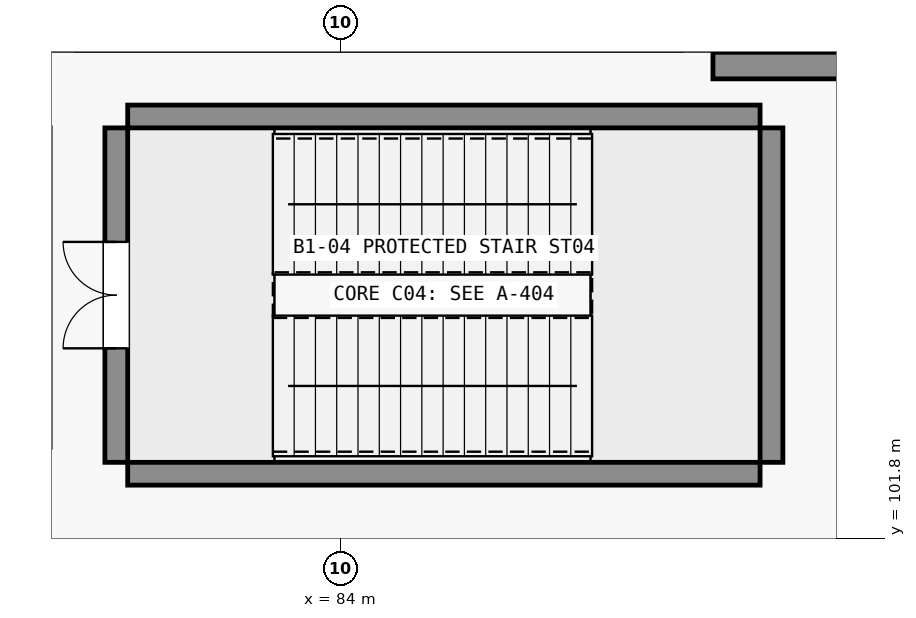
"""IFC4 building model, lengths in metres.
Left out: names, types, materials, properties, quantities, classifications, styles, units other than length and angle.
Written with IfcOpenShell. Run it as: python <this file> out.ifc"""

import sys

from ifc_helpers import new_model, si_unit, direction, frame, frame_2d, origin, place, context, subcontext, project, spatial, rectangle, extrude, element, fill, save


model = new_model("IFC4")
c1 = context("Model", 3, precision=1e-05, world=origin(), true_north=direction((0.0, 1.0)))
c2 = subcontext(c1, "Body", "Model", "MODEL_VIEW")
j1 = project(units=[si_unit("LENGTHUNIT", "METRE"), si_unit("PLANEANGLEUNIT", "RADIAN")], contexts=[c1])
p1 = place(None, origin())
s1 = spatial("IfcSite", under=j1, at=p1, CompositionType="ELEMENT")
p2 = place(p1, origin())
s2 = spatial("IfcBuilding", under=s1, at=p2, CompositionType="ELEMENT")
p3 = place(p2, frame((0.0, 0.0, -5.4)))
s3 = spatial("IfcBuildingStorey", under=s2, at=p3, CompositionType="ELEMENT", Elevation=-5.4)
for number, where, z_axis, x_axis in (
    (1, (81.2, 102.65, 0.0), (0.0, 0.0, 1.0), (1.0, 0.0, 0.0)),
    (2, (81.2, 107.35, 0.0), (0.0, 0.0, 1.0), (1.0, 0.0, 0.0)),
):
    element("IfcWall", number, at=place(p3, frame(where, z_axis=z_axis, x_axis=x_axis)), inside=s3, PredefinedType="SHEAR", context=c2, shape_type="SweptSolid", body=[
        extrude(rectangle(XDim=8.32, YDim=0.3, at=frame_2d((4.16, 0.0))), origin(), (0.0, 0.0, 1.0), 5.4),
    ])
p4 = place(p3, frame((81.05, 102.8, 0.0), z_axis=(0.0, 0.0, 1.0), x_axis=(0.0, 1.0, 0.0)))
e3 = element("IfcWall", 3, at=p4, inside=s3, PredefinedType="SHEAR", context=c2, shape_type="SweptSolid", body=[
    extrude(rectangle(XDim=4.4, YDim=0.3, at=frame_2d((2.2, 0.0))), origin(), (0.0, 0.0, 1.0), 5.4),
])
p5 = place(p4, frame((1.5, 0.0, 0.0)))
e4 = element("IfcOpeningElement", 4, at=p5, cuts=e3, PredefinedType="OPENING", context=c2, shape_type="SweptSolid", body=[
    extrude(rectangle(XDim=1.4, YDim=2.2, at=frame_2d((0.7, 1.1))), frame((0.0, 0.16, 0.0), z_axis=(0.0, -1.0, 0.0), x_axis=(1.0, 0.0, 0.0)), (0.0, 0.0, 1.0), 0.32),
])
p6 = place(p3, frame((89.67, 102.8, 0.0), z_axis=(0.0, 0.0, 1.0), x_axis=(0.0, 1.0, 0.0)))
e5 = element("IfcWall", 5, at=p6, inside=s3, PredefinedType="SHEAR", context=c2, shape_type="SweptSolid", body=[
    extrude(rectangle(XDim=4.4, YDim=0.3, at=frame_2d((2.2, 0.0))), origin(), (0.0, 0.0, 1.0), 5.4),
])
p7 = place(p3, frame((88.9, 108.02, 0.0), z_axis=(0.0, 0.0, 1.0), x_axis=(1.0, 0.0, 0.0)))
e6 = element("IfcWall", 6, at=p7, inside=s3, PredefinedType="SOLIDWALL", context=c2, shape_type="SweptSolid", body=[
    extrude(rectangle(XDim=5.1, YDim=0.35, at=frame_2d((2.55, 0.0))), origin(), (0.0, 0.0, 1.0), 4.96),
])
p8 = place(p5, origin())
e7 = element("IfcDoor", 7, at=p8, inside=s3, OperationType="DOUBLE_DOOR_SINGLE_SWING", PredefinedType="DOOR", context=c2, shape_type="SweptSolid", body=[
    extrude(rectangle(XDim=1.4, YDim=2.2, at=frame_2d((0.7, 1.1))), frame((0.0, 0.025, 0.0), z_axis=(0.0, -1.0, 0.0), x_axis=(1.0, 0.0, 0.0)), (0.0, 0.0, 1.0), 0.05),
])
fill(e4, e7)
save(model, sys.argv[1])
